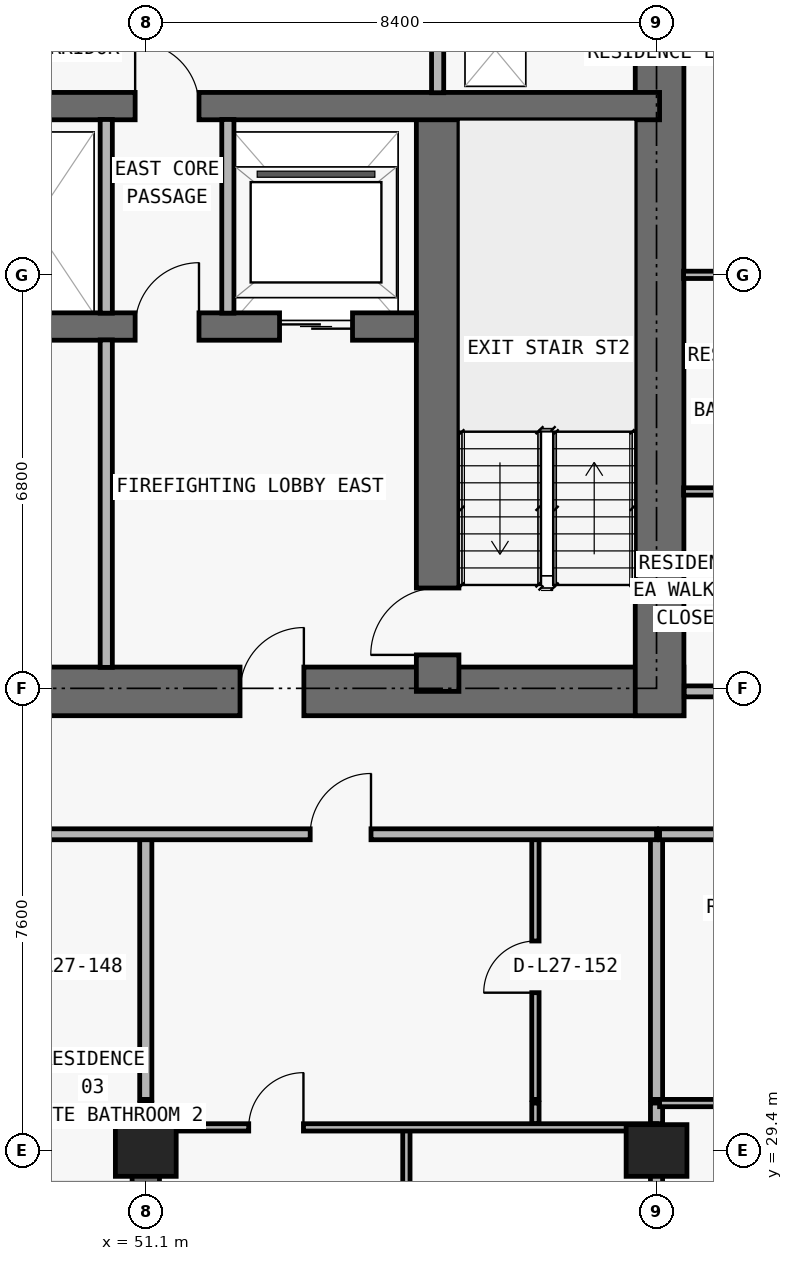
"""IFC4 building model, lengths in metres.
Left out: names, types, materials, properties, quantities, classifications, styles, units other than length and angle.
Written with IfcOpenShell. Run it as: python <this file> out.ifc"""

import sys

from ifc_helpers import new_model, si_unit, direction, frame, frame_2d, origin, origin_2d, place, context, subcontext, project, spatial, rectangle, extrude, element, fill, save


model = new_model("IFC4")
c1 = context("Model", 3, precision=1e-05, world=origin(), true_north=direction((0.0, 1.0)))
c2 = subcontext(c1, "Body", "Model", "MODEL_VIEW")
j1 = project(units=[si_unit("LENGTHUNIT", "METRE"), si_unit("PLANEANGLEUNIT", "RADIAN")], contexts=[c1])
p1 = place(None, origin())
s1 = spatial("IfcSite", under=j1, at=p1, CompositionType="ELEMENT")
p2 = place(p1, origin())
s2 = spatial("IfcBuilding", under=s1, at=p2, CompositionType="ELEMENT")
p3 = place(p2, frame((0.0, 0.0, 102.6)))
s3 = spatial("IfcBuildingStorey", under=s2, at=p3, CompositionType="ELEMENT", Elevation=102.6)
for number, where, z_axis, x_axis in (
    (1, (51.1, 29.4, 0.0), (0.0, 0.0, 1.0), (1.0, 0.0, 0.0)),
    (2, (59.5, 29.4, 0.0), (0.0, 0.0, 1.0), (1.0, 0.0, 0.0)),
):
    element("IfcColumn", number, at=place(p3, frame(where, z_axis=z_axis, x_axis=x_axis)), inside=s3, PredefinedType="COLUMN", context=c2, shape_type="SweptSolid", body=[
        extrude(rectangle(XDim=1.0, YDim=0.85, at=origin_2d()), origin(), (0.0, 0.0, 1.0), 3.05),
    ])
p4 = place(p3, frame((17.85, 36.95, 0.0), z_axis=(0.0, 0.0, 1.0), x_axis=(1.0, 0.0, 0.0)))
e3 = element("IfcWall", 3, at=p4, inside=s3, PredefinedType="SHEAR", context=c2, shape_type="SweptSolid", body=[
    extrude(rectangle(XDim=42.1, YDim=0.8, at=frame_2d((21.05, 0.0))), origin(), (0.0, 0.0, 1.0), 3.05),
])
p5 = place(p4, frame((14.45, 0.0, 0.0)))
e4 = element("IfcOpeningElement", 4, at=p5, cuts=e3, PredefinedType="OPENING", context=c2, shape_type="SweptSolid", body=[
    extrude(rectangle(XDim=1.1, YDim=2.15, at=frame_2d((0.55, 1.075))), frame((0.0, 0.41, 0.0), z_axis=(0.0, -1.0, 0.0), x_axis=(1.0, 0.0, 0.0)), (0.0, 0.0, 1.0), 0.82),
])
p6 = place(p4, frame((6.3, 0.0, 0.0)))
e5 = element("IfcOpeningElement", 5, at=p6, cuts=e3, PredefinedType="OPENING", context=c2, shape_type="SweptSolid", body=[
    extrude(rectangle(XDim=1.05, YDim=2.15, at=frame_2d((0.525, 1.075))), frame((0.0, 0.41, 0.0), z_axis=(0.0, -1.0, 0.0), x_axis=(1.0, 0.0, 0.0)), (0.0, 0.0, 1.0), 0.82),
])
p7 = place(p4, frame((34.8, 0.0, 0.0)))
e6 = element("IfcOpeningElement", 6, at=p7, cuts=e3, PredefinedType="OPENING", context=c2, shape_type="SweptSolid", body=[
    extrude(rectangle(XDim=1.05, YDim=2.15, at=frame_2d((0.525, 1.075))), frame((0.0, 0.41, 0.0), z_axis=(0.0, -1.0, 0.0), x_axis=(1.0, 0.0, 0.0)), (0.0, 0.0, 1.0), 0.82),
])
p8 = place(p4, frame((10.913, 0.0, 0.0)))
e7 = element("IfcOpeningElement", 7, at=p8, cuts=e3, PredefinedType="OPENING", context=c2, shape_type="SweptSolid", body=[
    extrude(rectangle(XDim=1.05, YDim=2.15, at=frame_2d((0.525, 1.075))), frame((0.0, 0.41, 0.0), z_axis=(0.0, -1.0, 0.0), x_axis=(1.0, 0.0, 0.0)), (0.0, 0.0, 1.0), 0.82),
])
p9 = place(p4, frame((24.15, 0.0, 0.0)))
e8 = element("IfcOpeningElement", 8, at=p9, cuts=e3, PredefinedType="OPENING", context=c2, shape_type="SweptSolid", body=[
    extrude(rectangle(XDim=1.05, YDim=2.15, at=frame_2d((0.525, 1.075))), frame((0.0, 0.41, 0.0), z_axis=(0.0, -1.0, 0.0), x_axis=(1.0, 0.0, 0.0)), (0.0, 0.0, 1.0), 0.82),
])
p10 = place(p3, frame((59.55, 36.55, 0.0), z_axis=(0.0, 0.0, 1.0), x_axis=(0.0, 1.0, 0.0)))
e9 = element("IfcWall", 9, at=p10, inside=s3, PredefinedType="SHEAR", context=c2, shape_type="SweptSolid", body=[
    extrude(rectangle(XDim=14.05, YDim=0.8, at=frame_2d((7.025, 0.0))), origin(), (0.0, 0.0, 1.0), 3.05),
])
p11 = place(p3, frame((55.9, 36.95, 0.0), z_axis=(0.0, 0.0, 1.0), x_axis=(0.0, 1.0, 0.0)))
e10 = element("IfcWall", 10, at=p11, inside=s3, PredefinedType="SHEAR", context=c2, shape_type="SweptSolid", body=[
    extrude(rectangle(XDim=9.625, YDim=0.7, at=frame_2d((4.812, 0.0))), origin(), (0.0, 0.0, 1.0), 3.05),
])
p12 = place(p11, frame((0.6, 0.0, 0.0)))
e11 = element("IfcOpeningElement", 11, at=p12, cuts=e10, PredefinedType="OPENING", context=c2, shape_type="SweptSolid", body=[
    extrude(rectangle(XDim=1.1, YDim=2.15, at=frame_2d((0.55, 1.075))), frame((0.0, 0.36, 0.0), z_axis=(0.0, -1.0, 0.0), x_axis=(1.0, 0.0, 0.0)), (0.0, 0.0, 1.0), 0.72),
])
p13 = place(p3, frame((22.25, 42.95, 0.0), z_axis=(0.0, 0.0, 1.0), x_axis=(1.0, 0.0, 0.0)))
e12 = element("IfcWall", 12, at=p13, inside=s3, PredefinedType="SHEAR", context=c2, shape_type="SweptSolid", body=[
    extrude(rectangle(XDim=33.3, YDim=0.45, at=frame_2d((16.65, 0.0))), origin(), (0.0, 0.0, 1.0), 3.05),
])
p14 = place(p13, frame((1.05, 0.0, 0.0)))
e13 = element("IfcOpeningElement", 13, at=p14, cuts=e12, PredefinedType="OPENING", context=c2, shape_type="SweptSolid", body=[
    extrude(rectangle(XDim=1.2, YDim=2.2, at=frame_2d((0.6, 1.1))), frame((0.0, 0.235, 0.0), z_axis=(0.0, -1.0, 0.0), x_axis=(1.0, 0.0, 0.0)), (0.0, 0.0, 1.0), 0.47),
])
p15 = place(p13, frame((31.05, 0.0, 0.0)))
e14 = element("IfcOpeningElement", 14, at=p15, cuts=e12, PredefinedType="OPENING", context=c2, shape_type="SweptSolid", body=[
    extrude(rectangle(XDim=1.2, YDim=2.2, at=frame_2d((0.6, 1.1))), frame((0.0, 0.235, 0.0), z_axis=(0.0, -1.0, 0.0), x_axis=(1.0, 0.0, 0.0)), (0.0, 0.0, 1.0), 0.47),
])
p16 = place(p13, frame((21.4, 0.0, 0.0)))
e15 = element("IfcOpeningElement", 15, at=p16, cuts=e12, PredefinedType="OPENING", context=c2, shape_type="SweptSolid", body=[
    extrude(rectangle(XDim=1.1, YDim=2.2, at=frame_2d((0.55, 1.1))), frame((0.0, 0.235, 0.0), z_axis=(0.0, -1.0, 0.0), x_axis=(1.0, 0.0, 0.0)), (0.0, 0.0, 1.0), 0.47),
])
p17 = place(p13, frame((24.0, 0.0, 0.0)))
e16 = element("IfcOpeningElement", 16, at=p17, cuts=e12, PredefinedType="OPENING", context=c2, shape_type="SweptSolid", body=[
    extrude(rectangle(XDim=1.1, YDim=2.2, at=frame_2d((0.55, 1.1))), frame((0.0, 0.235, 0.0), z_axis=(0.0, -1.0, 0.0), x_axis=(1.0, 0.0, 0.0)), (0.0, 0.0, 1.0), 0.47),
])
p18 = place(p13, frame((3.625, 0.0, 0.0)))
e17 = element("IfcOpeningElement", 17, at=p18, cuts=e12, PredefinedType="OPENING", context=c2, shape_type="SweptSolid", body=[
    extrude(rectangle(XDim=1.05, YDim=2.15, at=frame_2d((0.525, 1.075))), frame((0.0, 0.235, 0.0), z_axis=(0.0, -1.0, 0.0), x_axis=(1.0, 0.0, 0.0)), (0.0, 0.0, 1.0), 0.47),
])
p19 = place(p13, frame((28.675, 0.0, 0.0)))
e18 = element("IfcOpeningElement", 18, at=p19, cuts=e12, PredefinedType="OPENING", context=c2, shape_type="SweptSolid", body=[
    extrude(rectangle(XDim=1.05, YDim=2.15, at=frame_2d((0.525, 1.075))), frame((0.0, 0.235, 0.0), z_axis=(0.0, -1.0, 0.0), x_axis=(1.0, 0.0, 0.0)), (0.0, 0.0, 1.0), 0.47),
])
p20 = place(p13, frame((15.975, 0.0, 0.0)))
e19 = element("IfcOpeningElement", 19, at=p20, cuts=e12, PredefinedType="OPENING", context=c2, shape_type="SweptSolid", body=[
    extrude(rectangle(XDim=1.0, YDim=2.2, at=frame_2d((0.5, 1.1))), frame((0.0, 0.235, 0.0), z_axis=(0.0, -1.0, 0.0), x_axis=(1.0, 0.0, 0.0)), (0.0, 0.0, 1.0), 0.47),
])
p21 = place(p3, frame((18.25, 46.575, 0.0), z_axis=(0.0, 0.0, 1.0), x_axis=(1.0, 0.0, 0.0)))
e20 = element("IfcWall", 20, at=p21, inside=s3, PredefinedType="SHEAR", context=c2, shape_type="SweptSolid", body=[
    extrude(rectangle(XDim=41.3, YDim=0.45, at=frame_2d((20.65, 0.0))), origin(), (0.0, 0.0, 1.0), 3.05),
])
p22 = place(p21, frame((7.65, 0.0, 0.0)))
e21 = element("IfcOpeningElement", 21, at=p22, cuts=e20, PredefinedType="OPENING", context=c2, shape_type="SweptSolid", body=[
    extrude(rectangle(XDim=1.0, YDim=2.2, at=frame_2d((0.5, 1.1))), frame((0.0, 0.235, 0.0), z_axis=(0.0, -1.0, 0.0), x_axis=(1.0, 0.0, 0.0)), (0.0, 0.0, 1.0), 0.47),
])
p23 = place(p21, frame((32.675, 0.0, 0.0)))
e22 = element("IfcOpeningElement", 22, at=p23, cuts=e20, PredefinedType="OPENING", context=c2, shape_type="SweptSolid", body=[
    extrude(rectangle(XDim=1.05, YDim=2.15, at=frame_2d((0.525, 1.075))), frame((0.0, 0.235, 0.0), z_axis=(0.0, -1.0, 0.0), x_axis=(1.0, 0.0, 0.0)), (0.0, 0.0, 1.0), 0.47),
])
p24 = place(p3, frame((51.1, 20.8, 0.0), z_axis=(0.0, 0.0, 1.0), x_axis=(0.0, 1.0, 0.0)))
e23 = element("IfcWall", 23, at=p24, inside=s3, PredefinedType="SHEAR", context=c2, shape_type="SweptSolid", body=[
    extrude(rectangle(XDim=8.6, YDim=0.45, at=frame_2d((4.3, 0.0))), origin(), (0.0, 0.0, 1.0), 3.05),
])
p25 = place(p3, frame((50.45, 37.345, 0.0), z_axis=(0.0, 0.0, 1.0), x_axis=(0.0, 1.0, 0.0)))
e24 = element("IfcWall", 24, at=p25, inside=s3, PredefinedType="PARTITIONING", context=c2, shape_type="SweptSolid", body=[
    extrude(rectangle(XDim=5.385, YDim=0.2, at=frame_2d((2.692, 0.0))), origin(), (0.0, 0.0, 1.0), 3.05),
])
p26 = place(p3, frame((50.45, 43.17, 0.0), z_axis=(0.0, 0.0, 1.0), x_axis=(0.0, 1.0, 0.0)))
e25 = element("IfcWall", 25, at=p26, inside=s3, PredefinedType="PARTITIONING", context=c2, shape_type="SweptSolid", body=[
    extrude(rectangle(XDim=3.185, YDim=0.2, at=frame_2d((1.593, 0.0))), origin(), (0.0, 0.0, 1.0), 3.05),
])
p27 = place(p3, frame((51.1, 29.405, 0.0), z_axis=(0.0, 0.0, 1.0), x_axis=(0.0, 1.0, 0.0)))
e26 = element("IfcWall", 26, at=p27, inside=s3, PredefinedType="PARTITIONING", context=c2, shape_type="SweptSolid", body=[
    extrude(rectangle(XDim=0.375, YDim=0.2, at=frame_2d((0.188, 0.0))), origin(), (0.0, 0.0, 1.0), 3.05),
])
p28 = place(p3, frame((51.1, 29.84, 0.0), z_axis=(0.0, 0.0, 1.0), x_axis=(0.0, 1.0, 0.0)))
e27 = element("IfcWall", 27, at=p28, inside=s3, PredefinedType="PARTITIONING", context=c2, shape_type="SweptSolid", body=[
    extrude(rectangle(XDim=0.34, YDim=0.2, at=frame_2d((0.17, 0.0))), origin(), (0.0, 0.0, 1.0), 2.335),
])
p29 = place(p3, frame((51.1, 30.24, 0.0), z_axis=(0.0, 0.0, 1.0), x_axis=(0.0, 1.0, 0.0)))
e28 = element("IfcWall", 28, at=p29, inside=s3, PredefinedType="PARTITIONING", context=c2, shape_type="SweptSolid", body=[
    extrude(rectangle(XDim=4.36, YDim=0.2, at=frame_2d((2.18, 0.0))), origin(), (0.0, 0.0, 1.0), 2.335),
])
p30 = place(p3, frame((52.45, 43.17, 0.0), z_axis=(0.0, 0.0, 1.0), x_axis=(0.0, 1.0, 0.0)))
e29 = element("IfcWall", 29, at=p30, inside=s3, PredefinedType="PARTITIONING", context=c2, shape_type="SweptSolid", body=[
    extrude(rectangle(XDim=3.185, YDim=0.2, at=frame_2d((1.593, 0.0))), origin(), (0.0, 0.0, 1.0), 3.05),
])
p31 = place(p3, frame((55.386, 25.09, 0.0), z_axis=(0.0, 0.0, 1.0), x_axis=(0.0, 1.0, 0.0)))
e30 = element("IfcWall", 30, at=p31, inside=s3, PredefinedType="PARTITIONING", context=c2, shape_type="SweptSolid", body=[
    extrude(rectangle(XDim=4.69, YDim=0.12, at=frame_2d((2.345, 0.0))), origin(), (0.0, 0.0, 1.0), 2.725),
])
p32 = place(p31, frame((1.895, 0.0, 0.0)))
e31 = element("IfcOpeningElement", 31, at=p32, cuts=e30, PredefinedType="OPENING", context=c2, shape_type="SweptSolid", body=[
    extrude(rectangle(XDim=0.9, YDim=2.15, at=frame_2d((0.45, 1.075))), frame((0.0, 0.07, 0.0), z_axis=(0.0, -1.0, 0.0), x_axis=(1.0, 0.0, 0.0)), (0.0, 0.0, 1.0), 0.14),
])
p33 = place(p3, frame((55.9, 46.795, 0.0), z_axis=(0.0, 0.0, 1.0), x_axis=(0.0, 1.0, 0.0)))
e32 = element("IfcWall", 32, at=p33, inside=s3, PredefinedType="PARTITIONING", context=c2, shape_type="SweptSolid", body=[
    extrude(rectangle(XDim=3.16, YDim=0.2, at=frame_2d((1.58, 0.0))), origin(), (0.0, 0.0, 1.0), 3.05),
])
p34 = place(p3, frame((57.508, 29.84, 0.0), z_axis=(0.0, 0.0, 1.0), x_axis=(0.0, 1.0, 0.0)))
e33 = element("IfcWall", 33, at=p34, inside=s3, PredefinedType="PARTITIONING", context=c2, shape_type="SweptSolid", body=[
    extrude(rectangle(XDim=0.34, YDim=0.12, at=frame_2d((0.17, 0.0))), origin(), (0.0, 0.0, 1.0), 3.05),
])
p35 = place(p3, frame((57.508, 30.24, 0.0), z_axis=(0.0, 0.0, 1.0), x_axis=(0.0, 1.0, 0.0)))
e34 = element("IfcWall", 34, at=p35, inside=s3, PredefinedType="PARTITIONING", context=c2, shape_type="SweptSolid", body=[
    extrude(rectangle(XDim=4.36, YDim=0.12, at=frame_2d((2.18, 0.0))), origin(), (0.0, 0.0, 1.0), 3.05),
])
p36 = place(p35, frame((1.755, 0.0, 0.0)))
e35 = element("IfcOpeningElement", 35, at=p36, cuts=e34, PredefinedType="OPENING", context=c2, shape_type="SweptSolid", body=[
    extrude(rectangle(XDim=0.85, YDim=2.1, at=frame_2d((0.425, 1.05))), frame((0.0, 0.07, 0.0), z_axis=(0.0, -1.0, 0.0), x_axis=(1.0, 0.0, 0.0)), (0.0, 0.0, 1.0), 0.14),
])
p37 = place(p3, frame((59.5, 25.09, 0.0), z_axis=(0.0, 0.0, 1.0), x_axis=(0.0, 1.0, 0.0)))
e36 = element("IfcWall", 36, at=p37, inside=s3, PredefinedType="PARTITIONING", context=c2, shape_type="SweptSolid", body=[
    extrude(rectangle(XDim=4.69, YDim=0.2, at=frame_2d((2.345, 0.0))), origin(), (0.0, 0.0, 1.0), 2.174),
])
p38 = place(p3, frame((59.5, 29.84, 0.0), z_axis=(0.0, 0.0, 1.0), x_axis=(0.0, 1.0, 0.0)))
e37 = element("IfcWall", 37, at=p38, inside=s3, PredefinedType="PARTITIONING", context=c2, shape_type="SweptSolid", body=[
    extrude(rectangle(XDim=0.34, YDim=0.2, at=frame_2d((0.17, 0.0))), origin(), (0.0, 0.0, 1.0), 2.174),
])
p39 = place(p3, frame((59.5, 30.24, 0.0), z_axis=(0.0, 0.0, 1.0), x_axis=(0.0, 1.0, 0.0)))
e38 = element("IfcWall", 38, at=p39, inside=s3, PredefinedType="PARTITIONING", context=c2, shape_type="SweptSolid", body=[
    extrude(rectangle(XDim=4.36, YDim=0.2, at=frame_2d((2.18, 0.0))), origin(), (0.0, 0.0, 1.0), 2.174),
])
p40 = place(p3, frame((51.1, 29.78, 0.0), z_axis=(0.0, 0.0, 1.0), x_axis=(1.0, 0.0, 0.0)))
e39 = element("IfcWall", 39, at=p40, inside=s3, PredefinedType="PARTITIONING", context=c2, shape_type="SweptSolid", body=[
    extrude(rectangle(XDim=8.4, YDim=0.12, at=frame_2d((4.2, 0.0))), origin(), (0.0, 0.0, 1.0), 3.05),
])
p41 = place(p40, frame((1.693, 0.0, 0.0)))
e40 = element("IfcOpeningElement", 40, at=p41, cuts=e39, PredefinedType="OPENING", context=c2, shape_type="SweptSolid", body=[
    extrude(rectangle(XDim=0.9, YDim=2.15, at=frame_2d((0.45, 1.075))), frame((0.0, 0.07, 0.0), z_axis=(0.0, -1.0, 0.0), x_axis=(1.0, 0.0, 0.0)), (0.0, 0.0, 1.0), 0.14),
])
p42 = place(p3, frame((59.55, 30.18, 0.0), z_axis=(0.0, 0.0, 1.0), x_axis=(1.0, 0.0, 0.0)))
e41 = element("IfcWall", 41, at=p42, inside=s3, PredefinedType="PARTITIONING", context=c2, shape_type="SweptSolid", body=[
    extrude(rectangle(XDim=8.35, YDim=0.12, at=frame_2d((4.175, 0.0))), origin(), (0.0, 0.0, 1.0), 3.05),
])
p43 = place(p42, frame((1.793, 0.0, 0.0)))
e42 = element("IfcOpeningElement", 42, at=p43, cuts=e41, PredefinedType="OPENING", context=c2, shape_type="SweptSolid", body=[
    extrude(rectangle(XDim=0.9, YDim=2.15, at=frame_2d((0.45, 1.075))), frame((0.0, 0.07, 0.0), z_axis=(0.0, -1.0, 0.0), x_axis=(1.0, 0.0, 0.0)), (0.0, 0.0, 1.0), 0.14),
])
p44 = place(p3, frame((18.3, 34.6, 0.0), z_axis=(0.0, 0.0, 1.0), x_axis=(1.0, 0.0, 0.0)))
e43 = element("IfcWall", 43, at=p44, inside=s3, PredefinedType="PARTITIONING", context=c2, shape_type="SweptSolid", body=[
    extrude(rectangle(XDim=41.2, YDim=0.18, at=frame_2d((20.6, 0.0))), origin(), (0.0, 0.0, 1.0), 3.05),
])
p45 = place(p44, frame((2.691, 0.0, 0.0)))
e44 = element("IfcOpeningElement", 44, at=p45, cuts=e43, PredefinedType="OPENING", context=c2, shape_type="SweptSolid", body=[
    extrude(rectangle(XDim=1.0, YDim=2.2, at=frame_2d((0.5, 1.1))), frame((0.0, 0.1, 0.0), z_axis=(0.0, -1.0, 0.0), x_axis=(1.0, 0.0, 0.0)), (0.0, 0.0, 1.0), 0.2),
])
p46 = place(p44, frame((11.212, 0.0, 0.0)))
e45 = element("IfcOpeningElement", 45, at=p46, cuts=e43, PredefinedType="OPENING", context=c2, shape_type="SweptSolid", body=[
    extrude(rectangle(XDim=1.0, YDim=2.2, at=frame_2d((0.5, 1.1))), frame((0.0, 0.1, 0.0), z_axis=(0.0, -1.0, 0.0), x_axis=(1.0, 0.0, 0.0)), (0.0, 0.0, 1.0), 0.2),
])
p47 = place(p44, frame((35.504, 0.0, 0.0)))
e46 = element("IfcOpeningElement", 46, at=p47, cuts=e43, PredefinedType="OPENING", context=c2, shape_type="SweptSolid", body=[
    extrude(rectangle(XDim=1.0, YDim=2.2, at=frame_2d((0.5, 1.1))), frame((0.0, 0.1, 0.0), z_axis=(0.0, -1.0, 0.0), x_axis=(1.0, 0.0, 0.0)), (0.0, 0.0, 1.0), 0.2),
])
p48 = place(p3, frame((59.55, 34.6, 0.0), z_axis=(0.0, 0.0, 1.0), x_axis=(1.0, 0.0, 0.0)))
e47 = element("IfcWall", 47, at=p48, inside=s3, PredefinedType="PARTITIONING", context=c2, shape_type="SweptSolid", body=[
    extrude(rectangle(XDim=10.55, YDim=0.18, at=frame_2d((5.275, 0.0))), origin(), (0.0, 0.0, 1.0), 3.05),
])
p49 = place(p48, frame((2.51, 0.0, 0.0)))
e48 = element("IfcOpeningElement", 48, at=p49, cuts=e47, PredefinedType="OPENING", context=c2, shape_type="SweptSolid", body=[
    extrude(rectangle(XDim=1.0, YDim=2.2, at=frame_2d((0.5, 1.1))), frame((0.0, 0.1, 0.0), z_axis=(0.0, -1.0, 0.0), x_axis=(1.0, 0.0, 0.0)), (0.0, 0.0, 1.0), 0.2),
])
p50 = place(p3, frame((59.955, 36.95, 0.0), z_axis=(0.0, 0.0, 1.0), x_axis=(1.0, 0.0, 0.0)))
e49 = element("IfcWall", 49, at=p50, inside=s3, PredefinedType="PARTITIONING", context=c2, shape_type="SweptSolid", body=[
    extrude(rectangle(XDim=10.145, YDim=0.18, at=frame_2d((5.073, 0.0))), origin(), (0.0, 0.0, 1.0), 3.05),
])
p51 = place(p50, frame((3.957, 0.0, 0.0)))
e50 = element("IfcOpeningElement", 50, at=p51, cuts=e49, PredefinedType="OPENING", context=c2, shape_type="SweptSolid", body=[
    extrude(rectangle(XDim=1.0, YDim=2.2, at=frame_2d((0.5, 1.1))), frame((0.0, 0.1, 0.0), z_axis=(0.0, -1.0, 0.0), x_axis=(1.0, 0.0, 0.0)), (0.0, 0.0, 1.0), 0.2),
])
p52 = place(p3, frame((59.945, 40.238, 0.0), z_axis=(0.0, 0.0, 1.0), x_axis=(1.0, 0.0, 0.0)))
e51 = element("IfcWall", 51, at=p52, inside=s3, PredefinedType="PARTITIONING", context=c2, shape_type="SweptSolid", body=[
    extrude(rectangle(XDim=2.255, YDim=0.12, at=frame_2d((1.127, 0.0))), origin(), (0.0, 0.0, 1.0), 3.05),
])
p53 = place(p3, frame((59.945, 43.8, 0.0), z_axis=(0.0, 0.0, 1.0), x_axis=(1.0, 0.0, 0.0)))
e52 = element("IfcWall", 52, at=p53, inside=s3, PredefinedType="PARTITIONING", context=c2, shape_type="SweptSolid", body=[
    extrude(rectangle(XDim=13.66, YDim=0.12, at=frame_2d((6.83, 0.0))), origin(), (0.0, 0.0, 1.0), 2.339),
])
p54 = place(p53, frame((4.017, 0.0, 0.0)))
e53 = element("IfcOpeningElement", 53, at=p54, cuts=e52, PredefinedType="OPENING", context=c2, shape_type="SweptSolid", body=[
    extrude(rectangle(XDim=0.9, YDim=2.15, at=frame_2d((0.45, 1.075))), frame((0.0, 0.07, 0.0), z_axis=(0.0, -1.0, 0.0), x_axis=(1.0, 0.0, 0.0)), (0.0, 0.0, 1.0), 0.14),
])
p55 = place(p53, frame((0.702, 0.0, 0.0)))
e54 = element("IfcOpeningElement", 54, at=p55, cuts=e52, PredefinedType="OPENING", context=c2, shape_type="SweptSolid", body=[
    extrude(rectangle(XDim=0.85, YDim=2.1, at=frame_2d((0.425, 1.05))), frame((0.0, 0.07, 0.0), z_axis=(0.0, -1.0, 0.0), x_axis=(1.0, 0.0, 0.0)), (0.0, 0.0, 1.0), 0.14),
])
p56 = place(p15, origin())
e55 = element("IfcDoor", 55, at=p56, inside=s3, OperationType="DOUBLE_DOOR_SLIDING", PredefinedType="DOOR", context=c2, shape_type="SweptSolid", body=[
    extrude(rectangle(XDim=1.2, YDim=2.2, at=frame_2d((0.6, 1.1))), frame((0.0, 0.025, 0.0), z_axis=(0.0, -1.0, 0.0), x_axis=(1.0, 0.0, 0.0)), (0.0, 0.0, 1.0), 0.05),
])
fill(e14, e55)
p57 = place(p7, origin())
e56 = element("IfcDoor", 56, at=p57, inside=s3, OperationType="SINGLE_SWING_RIGHT", PredefinedType="DOOR", context=c2, shape_type="SweptSolid", body=[
    extrude(rectangle(XDim=1.05, YDim=2.15, at=frame_2d((0.525, 1.075))), frame((0.0, 0.025, 0.0), z_axis=(0.0, -1.0, 0.0), x_axis=(1.0, 0.0, 0.0)), (0.0, 0.0, 1.0), 0.05),
])
fill(e6, e56)
p58 = place(p12, origin())
e57 = element("IfcDoor", 57, at=p58, inside=s3, OperationType="SINGLE_SWING_LEFT", PredefinedType="DOOR", context=c2, shape_type="SweptSolid", body=[
    extrude(rectangle(XDim=1.1, YDim=2.15, at=frame_2d((0.55, 1.075))), frame((0.0, 0.025, 0.0), z_axis=(0.0, -1.0, 0.0), x_axis=(1.0, 0.0, 0.0)), (0.0, 0.0, 1.0), 0.05),
])
fill(e11, e57)
p59 = place(p19, origin())
e58 = element("IfcDoor", 58, at=p59, inside=s3, OperationType="SINGLE_SWING_RIGHT", PredefinedType="DOOR", context=c2, shape_type="SweptSolid", body=[
    extrude(rectangle(XDim=1.05, YDim=2.15, at=frame_2d((0.525, 1.075))), frame((0.0, 0.025, 0.0), z_axis=(0.0, -1.0, 0.0), x_axis=(1.0, 0.0, 0.0)), (0.0, 0.0, 1.0), 0.05),
])
fill(e18, e58)
p60 = place(p23, origin())
e59 = element("IfcDoor", 59, at=p60, inside=s3, OperationType="SINGLE_SWING_LEFT", PredefinedType="DOOR", context=c2, shape_type="SweptSolid", body=[
    extrude(rectangle(XDim=1.05, YDim=2.15, at=frame_2d((0.525, 1.075))), frame((0.0, 0.025, 0.0), z_axis=(0.0, -1.0, 0.0), x_axis=(1.0, 0.0, 0.0)), (0.0, 0.0, 1.0), 0.05),
])
fill(e22, e59)
p61 = place(p47, origin())
e60 = element("IfcDoor", 60, at=p61, inside=s3, OperationType="SINGLE_SWING_RIGHT", PredefinedType="DOOR", context=c2, shape_type="SweptSolid", body=[
    extrude(rectangle(XDim=1.0, YDim=2.2, at=frame_2d((0.5, 1.1))), frame((0.0, 0.025, 0.0), z_axis=(0.0, -1.0, 0.0), x_axis=(1.0, 0.0, 0.0)), (0.0, 0.0, 1.0), 0.05),
])
fill(e46, e60)
p62 = place(p36, origin())
e61 = element("IfcDoor", 61, at=p62, inside=s3, OperationType="SINGLE_SWING_LEFT", PredefinedType="DOOR", context=c2, shape_type="SweptSolid", body=[
    extrude(rectangle(XDim=0.85, YDim=2.1, at=frame_2d((0.425, 1.05))), frame((0.0, 0.025, 0.0), z_axis=(0.0, -1.0, 0.0), x_axis=(1.0, 0.0, 0.0)), (0.0, 0.0, 1.0), 0.05),
])
fill(e35, e61)
p63 = place(p41, origin())
e62 = element("IfcDoor", 62, at=p63, inside=s3, OperationType="SINGLE_SWING_RIGHT", PredefinedType="DOOR", context=c2, shape_type="SweptSolid", body=[
    extrude(rectangle(XDim=0.9, YDim=2.15, at=frame_2d((0.45, 1.075))), frame((0.0, 0.025, 0.0), z_axis=(0.0, -1.0, 0.0), x_axis=(1.0, 0.0, 0.0)), (0.0, 0.0, 1.0), 0.05),
])
fill(e40, e62)
save(model, sys.argv[1])
